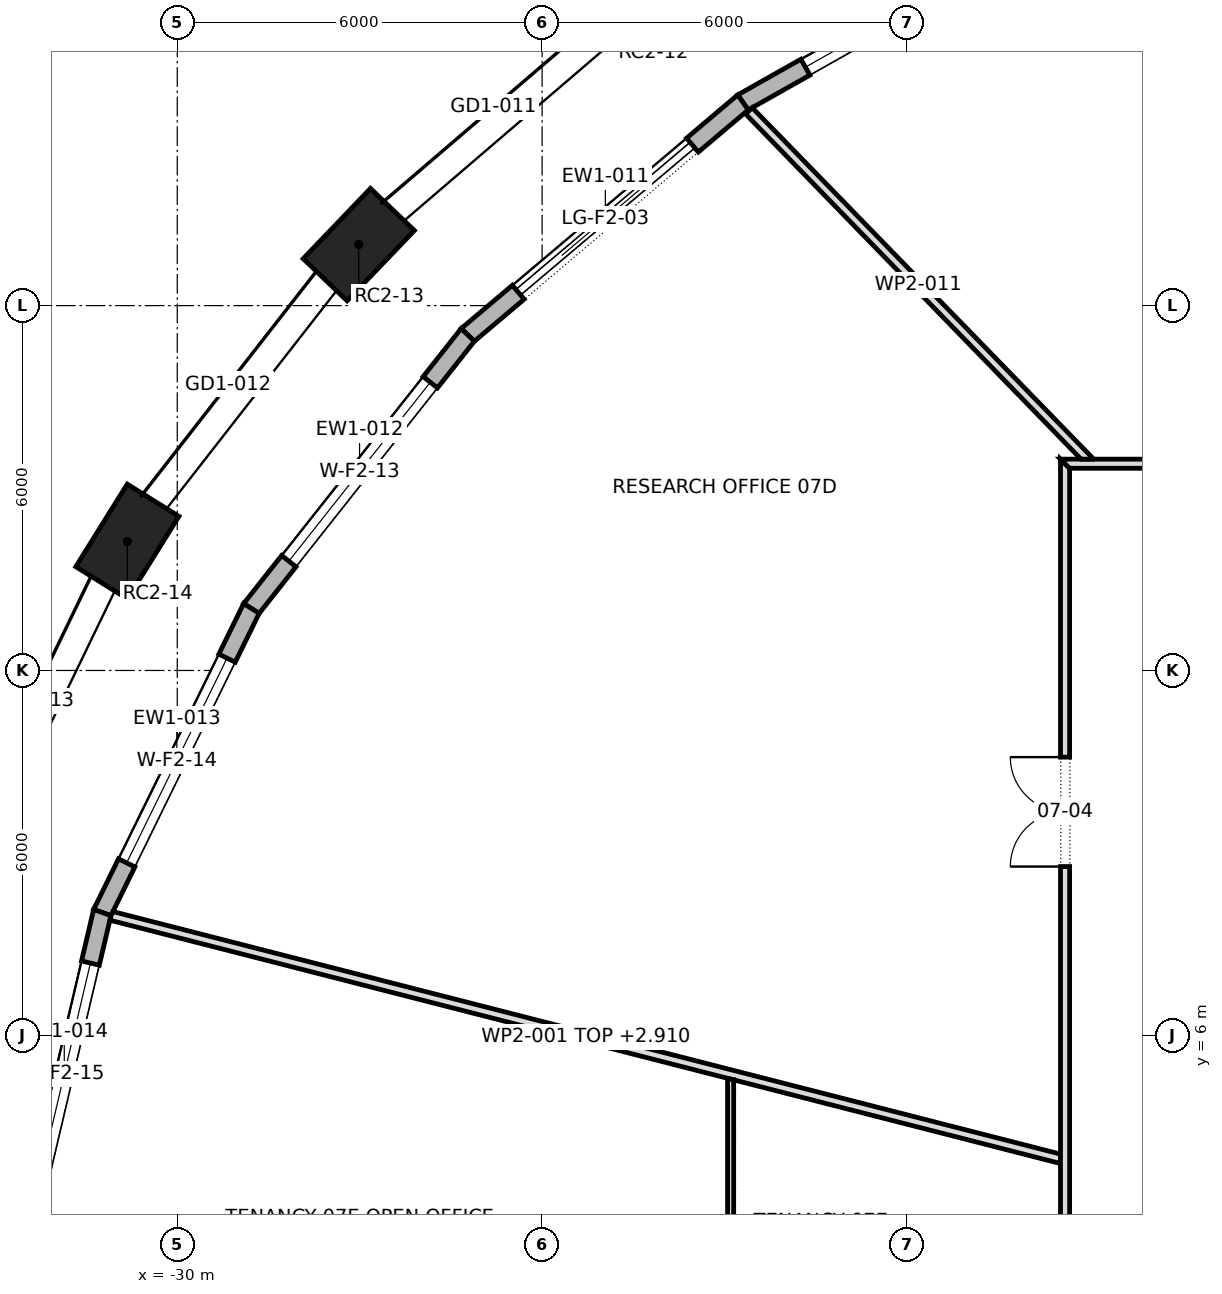
"""IFC4 building model, lengths in metres.
Left out: names, types, materials, properties, quantities, classifications, styles, units other than length and angle.
Written with IfcOpenShell. Run it as: python <this file> out.ifc"""

import sys

from ifc_helpers import new_model, si_unit, direction, frame, frame_2d, origin, origin_2d, place, context, subcontext, project, spatial, polyline, rectangle, outline, extrude, element, fill, save


model = new_model("IFC4")
c1 = context("Model", 3, precision=1e-05, world=origin(), true_north=direction((0.0, 1.0)))
c2 = subcontext(c1, "Body", "Model", "MODEL_VIEW")
j1 = project(units=[si_unit("LENGTHUNIT", "METRE"), si_unit("PLANEANGLEUNIT", "RADIAN")], contexts=[c1])
p1 = place(None, origin())
s1 = spatial("IfcSite", under=j1, at=p1, CompositionType="ELEMENT")
p2 = place(p1, origin())
s2 = spatial("IfcBuilding", under=s1, at=p2, CompositionType="ELEMENT")
p3 = place(p2, frame((0.0, 0.0, 112.9)))
s3 = spatial("IfcBuildingStorey", under=s2, at=p3, CompositionType="ELEMENT", Elevation=112.9)
for number, where, z_axis, x_axis in (
    (1, (-27.015, 19.003, 0.0), (0.0, 0.0, 1.0), (-0.692, -0.722, 0.0)),
    (2, (-30.821, 14.121, 0.0), (0.0, 0.0, 1.0), (-0.529, -0.849, 0.0)),
):
    element("IfcColumn", number, at=place(p3, frame(where, z_axis=z_axis, x_axis=x_axis)), inside=s3, PredefinedType="COLUMN", context=c2, shape_type="SweptSolid", body=[
        extrude(rectangle(XDim=1.6, YDim=1.0, at=origin_2d()), origin(), (0.0, 0.0, 1.0), 4.2),
    ])
p4 = place(p3, frame((-15.377, 24.344, 0.0), z_axis=(0.0, 0.0, 1.0), x_axis=(-0.870828448417, -0.491587035455, 0.0)))
e3 = element("IfcWall", 3, at=p4, inside=s3, PredefinedType="STANDARD", context=c2, shape_type="SweptSolid", body=[
    extrude(outline(polyline([(-0.013, -0.15), (6.123, -0.15), (6.094, 0.15), (0.013, 0.15), (-0.013, -0.15)])), origin(), (0.0, 0.0, 1.0), 3.9),
])
p5 = place(p4, frame((1.179, 0.0, 0.6)))
e4 = element("IfcOpeningElement", 4, at=p5, cuts=e3, PredefinedType="OPENING", context=c2, shape_type="SweptSolid", body=[
    extrude(rectangle(XDim=3.75, YDim=2.85, at=frame_2d((1.875, 1.425))), frame((0.0, 0.162, 0.0), z_axis=(0.0, -1.0, 0.0), x_axis=(1.0, 0.0, 0.0)), (0.0, 0.0, 1.0), 0.324),
])
p6 = place(p3, frame((-20.697, 21.341, 0.0), z_axis=(0.0, 0.0, 1.0), x_axis=(-0.763894031266, -0.645341699409, 0.0)))
e5 = element("IfcWall", 5, at=p6, inside=s3, PredefinedType="STANDARD", context=c2, shape_type="SweptSolid", body=[
    extrude(outline(polyline([(-0.014, -0.15), (5.94, -0.15), (5.91, 0.15), (0.014, 0.15), (-0.014, -0.15)])), origin(), (0.0, 0.0, 1.0), 3.9),
])
p7 = place(p6, frame((1.087, 0.0, 0.0)))
e6 = element("IfcOpeningElement", 6, at=p7, cuts=e5, PredefinedType="OPENING", context=c2, shape_type="SweptSolid", body=[
    extrude(rectangle(XDim=3.75, YDim=3.45, at=frame_2d((1.875, 1.725))), frame((0.0, 0.162, 0.0), z_axis=(0.0, -1.0, 0.0), x_axis=(1.0, 0.0, 0.0)), (0.0, 0.0, 1.0), 0.324),
])
p8 = place(p3, frame((-25.223, 17.518, 0.0), z_axis=(0.0, 0.0, 1.0), x_axis=(-0.620329992039, -0.784340934146, 0.0)))
e7 = element("IfcWall", 7, at=p8, inside=s3, PredefinedType="STANDARD", context=c2, shape_type="SweptSolid", body=[
    extrude(outline(polyline([(-0.015, -0.15), (5.751, -0.15), (5.719, 0.15), (0.015, 0.15), (-0.015, -0.15)])), origin(), (0.0, 0.0, 1.0), 3.9),
])
p9 = place(p8, frame((0.993, 0.0, 0.6)))
e8 = element("IfcOpeningElement", 8, at=p9, cuts=e7, PredefinedType="OPENING", context=c2, shape_type="SweptSolid", body=[
    extrude(rectangle(XDim=3.75, YDim=2.85, at=frame_2d((1.875, 1.425))), frame((0.0, 0.162, 0.0), z_axis=(0.0, -1.0, 0.0), x_axis=(1.0, 0.0, 0.0)), (0.0, 0.0, 1.0), 0.324),
])
p10 = place(p3, frame((-28.781, 13.019, 0.0), z_axis=(0.0, 0.0, 1.0), x_axis=(-0.440238988749, -0.897880633929, 0.0)))
e9 = element("IfcWall", 9, at=p10, inside=s3, PredefinedType="STANDARD", context=c2, shape_type="SweptSolid", body=[
    extrude(outline(polyline([(-0.016, -0.15), (5.586, -0.15), (5.553, 0.15), (0.016, 0.15), (-0.016, -0.15)])), origin(), (0.0, 0.0, 1.0), 3.9),
])
p11 = place(p10, frame((0.91, 0.0, 0.6)))
e10 = element("IfcOpeningElement", 10, at=p11, cuts=e9, PredefinedType="OPENING", context=c2, shape_type="SweptSolid", body=[
    extrude(rectangle(XDim=3.75, YDim=2.85, at=frame_2d((1.875, 1.425))), frame((0.0, 0.162, 0.0), z_axis=(0.0, -1.0, 0.0), x_axis=(1.0, 0.0, 0.0)), (0.0, 0.0, 1.0), 0.324),
])
p12 = place(p3, frame((-31.233, 8.019, 0.0), z_axis=(0.0, 0.0, 1.0), x_axis=(-0.229193964616, -0.973380771632, 0.0)))
e11 = element("IfcWall", 11, at=p12, inside=s3, PredefinedType="STANDARD", context=c2, shape_type="SweptSolid", body=[
    extrude(outline(polyline([(-0.017, -0.15), (5.473, -0.15), (5.439, 0.15), (0.017, 0.15), (-0.017, -0.15)])), origin(), (0.0, 0.0, 1.0), 3.9),
])
p13 = place(p12, frame((0.853, 0.0, 0.6)))
e12 = element("IfcOpeningElement", 12, at=p13, cuts=e11, PredefinedType="OPENING", context=c2, shape_type="SweptSolid", body=[
    extrude(rectangle(XDim=3.75, YDim=2.85, at=frame_2d((1.875, 1.425))), frame((0.0, 0.162, 0.0), z_axis=(0.0, -1.0, 0.0), x_axis=(1.0, 0.0, 0.0)), (0.0, 0.0, 1.0), 0.324),
])
p14 = place(p3, frame((-31.09, 7.966, 0.0), z_axis=(0.0, 0.0, 1.0), x_axis=(0.968771016809, -0.247957086995, 0.0)))
e13 = element("IfcWall", 13, at=p14, inside=s3, PredefinedType="PARTITIONING", context=c2, shape_type="SweptSolid", body=[
    extrude(outline(polyline([(16.137, -0.075), (16.137, -0.073), (16.099, 0.075), (14.312, 0.075), (12.524, 0.075), (10.737, 0.075), (8.95, 0.075), (7.163, 0.075), (5.375, 0.075), (3.588, 0.075), (1.801, 0.075), (0.014, 0.075), (0.0, 0.008), (0.0, -0.067), (0.0, -0.075), (1.793, -0.075), (3.586, -0.075), (5.379, -0.075), (7.172, -0.075), (8.965, -0.075), (10.758, -0.075), (12.551, -0.075), (14.344, -0.075), (16.137, -0.075)])), origin(), (0.0, 0.0, 1.0), 2.91),
])
p15 = place(p3, frame((-20.9, -14.434, 0.0), z_axis=(0.0, 0.0, 1.0), x_axis=(0.0, 1.0, 0.0)))
e14 = element("IfcWall", 14, at=p15, inside=s3, PredefinedType="PARTITIONING", context=c2, shape_type="SweptSolid", body=[
    extrude(outline(polyline([(0.069, -0.05), (1.772, -0.05), (3.475, -0.05), (5.178, -0.05), (6.881, -0.05), (8.583, -0.05), (8.583, -0.05), (8.684, -0.05), (8.684, -0.05), (10.321, -0.05), (11.958, -0.05), (13.596, -0.05), (15.234, -0.05), (15.234, -0.05), (15.333, -0.05), (15.333, -0.05), (16.789, -0.05), (18.245, -0.05), (19.701, -0.05), (19.727, 0.05), (19.727, 0.05), (17.942, 0.05), (16.156, 0.05), (14.372, 0.05), (12.587, 0.05), (10.802, 0.05), (9.017, 0.05), (9.01, 0.048), (9.009, 0.05), (7.208, 0.05), (5.406, 0.05), (3.604, 0.05), (1.802, 0.05), (0.0, 0.05), (0.069, -0.05)])), origin(), (0.0, 0.0, 1.0), 3.9),
])
p16 = place(p15, frame((13.539, 0.0, 0.0)))
e15 = element("IfcOpeningElement", 15, at=p16, cuts=e14, PredefinedType="OPENING", context=c2, shape_type="SweptSolid", body=[
    extrude(rectangle(XDim=0.9, YDim=2.1, at=frame_2d((0.45, 1.05))), frame((0.0, 0.062, 0.0), z_axis=(0.0, -1.0, 0.0), x_axis=(1.0, 0.0, 0.0)), (0.0, 0.0, 1.0), 0.124),
])
p17 = place(p3, frame((-15.4, -15.475, 0.0), z_axis=(0.0, 0.0, 1.0), x_axis=(0.0, 1.0, 0.0)))
e16 = element("IfcWall", 16, at=p17, inside=s3, PredefinedType="PARTITIONING", context=c2, shape_type="SweptSolid", body=[
    extrude(outline(polyline([(0.15, -0.075), (2.066, -0.075), (3.981, -0.075), (5.897, -0.075), (7.812, -0.075), (9.728, -0.075), (11.644, -0.075), (13.56, -0.075), (15.475, -0.075), (17.391, -0.075), (19.306, -0.075), (21.222, -0.075), (23.138, -0.075), (25.053, -0.075), (26.969, -0.075), (28.885, -0.075), (30.8, -0.075), (30.95, 0.075), (29.016, 0.075), (27.081, 0.075), (25.147, 0.075), (23.212, 0.075), (21.278, 0.075), (19.344, 0.075), (17.409, 0.075), (15.475, 0.075), (13.541, 0.075), (11.606, 0.075), (9.672, 0.075), (7.738, 0.075), (5.803, 0.075), (3.869, 0.075), (1.935, 0.075), (0.0, 0.075), (0.15, -0.075)])), origin(), (0.0, 0.0, 1.0), 3.9),
])
p18 = place(p17, frame((24.25, 0.0, 0.0)))
e17 = element("IfcOpeningElement", 17, at=p18, cuts=e16, PredefinedType="OPENING", context=c2, shape_type="SweptSolid", body=[
    extrude(rectangle(XDim=1.8, YDim=2.1, at=frame_2d((0.9, 1.05))), frame((0.0, 0.087, 0.0), z_axis=(0.0, -1.0, 0.0), x_axis=(1.0, 0.0, 0.0)), (0.0, 0.0, 1.0), 0.174),
])
p19 = place(p17, frame((6.735, 0.0, 0.0)))
e18 = element("IfcOpeningElement", 18, at=p19, cuts=e16, PredefinedType="OPENING", context=c2, shape_type="SweptSolid", body=[
    extrude(rectangle(XDim=1.0, YDim=2.1, at=frame_2d((0.5, 1.05))), frame((0.0, 0.087, 0.0), z_axis=(0.0, -1.0, 0.0), x_axis=(1.0, 0.0, 0.0)), (0.0, 0.0, 1.0), 0.174),
])
p20 = place(p17, frame((12.5, 0.0, 0.0)))
e19 = element("IfcOpeningElement", 19, at=p20, cuts=e16, PredefinedType="OPENING", context=c2, shape_type="SweptSolid", body=[
    extrude(rectangle(XDim=1.0, YDim=2.1, at=frame_2d((0.5, 1.05))), frame((0.0, 0.087, 0.0), z_axis=(0.0, -1.0, 0.0), x_axis=(1.0, 0.0, 0.0)), (0.0, 0.0, 1.0), 0.174),
])
p21 = place(p17, frame((17.375, 0.0, 0.0)))
e20 = element("IfcOpeningElement", 20, at=p21, cuts=e16, PredefinedType="OPENING", context=c2, shape_type="SweptSolid", body=[
    extrude(rectangle(XDim=1.0, YDim=2.1, at=frame_2d((0.5, 1.05))), frame((0.0, 0.087, 0.0), z_axis=(0.0, -1.0, 0.0), x_axis=(1.0, 0.0, 0.0)), (0.0, 0.0, 1.0), 0.174),
])
p22 = place(p3, frame((-15.475, 15.4, 0.0), z_axis=(0.0, 0.0, 1.0), x_axis=(1.0, 0.0, 0.0)))
e21 = element("IfcWall", 21, at=p22, inside=s3, PredefinedType="PARTITIONING", context=c2, shape_type="SweptSolid", body=[
    extrude(outline(polyline([(0.15, -0.075), (2.066, -0.075), (3.981, -0.075), (5.897, -0.075), (7.812, -0.075), (9.728, -0.075), (11.644, -0.075), (13.56, -0.075), (15.475, -0.075), (17.391, -0.075), (19.306, -0.075), (21.222, -0.075), (23.138, -0.075), (25.053, -0.075), (26.969, -0.075), (28.885, -0.075), (30.8, -0.075), (30.95, 0.075), (29.016, 0.075), (27.081, 0.075), (25.147, 0.075), (23.212, 0.075), (21.278, 0.075), (19.344, 0.075), (17.409, 0.075), (15.475, 0.075), (13.541, 0.075), (11.606, 0.075), (9.672, 0.075), (7.738, 0.075), (5.803, 0.075), (3.869, 0.075), (1.935, 0.075), (0.0, 0.075), (0.15, -0.075)])), origin(), (0.0, 0.0, 1.0), 3.9),
])
p23 = place(p22, frame((27.545, 0.0, 0.0)))
e22 = element("IfcOpeningElement", 22, at=p23, cuts=e21, PredefinedType="OPENING", context=c2, shape_type="SweptSolid", body=[
    extrude(rectangle(XDim=1.0, YDim=2.1, at=frame_2d((0.5, 1.05))), frame((0.0, 0.087, 0.0), z_axis=(0.0, -1.0, 0.0), x_axis=(1.0, 0.0, 0.0)), (0.0, 0.0, 1.0), 0.174),
])
p24 = place(p22, frame((18.545, 0.0, 0.0)))
e23 = element("IfcOpeningElement", 23, at=p24, cuts=e21, PredefinedType="OPENING", context=c2, shape_type="SweptSolid", body=[
    extrude(rectangle(XDim=1.8, YDim=2.1, at=frame_2d((0.9, 1.05))), frame((0.0, 0.087, 0.0), z_axis=(0.0, -1.0, 0.0), x_axis=(1.0, 0.0, 0.0)), (0.0, 0.0, 1.0), 0.174),
])
p25 = place(p22, frame((6.195, 0.0, 0.0)))
e24 = element("IfcOpeningElement", 24, at=p25, cuts=e21, PredefinedType="OPENING", context=c2, shape_type="SweptSolid", body=[
    extrude(rectangle(XDim=1.8, YDim=2.1, at=frame_2d((0.9, 1.05))), frame((0.0, 0.087, 0.0), z_axis=(0.0, -1.0, 0.0), x_axis=(1.0, 0.0, 0.0)), (0.0, 0.0, 1.0), 0.174),
])
p26 = place(p3, frame((-14.982, 15.423, 0.0), z_axis=(0.0, 0.0, 1.0), x_axis=(-0.696915710248, 0.717153046992, 0.0)))
e25 = element("IfcWall", 25, at=p26, inside=s3, PredefinedType="PARTITIONING", context=c2, shape_type="SweptSolid", body=[
    extrude(outline(polyline([(8.059, 0.075), (6.08, 0.075), (4.102, 0.075), (2.124, 0.075), (0.146, 0.075), (0.0, -0.075), (0.0, -0.075), (1.612, -0.075), (3.223, -0.075), (4.835, -0.075), (6.447, -0.075), (8.059, -0.075), (8.059, 0.075)])), origin(), (0.0, 0.0, 1.0), 3.9),
])
p27 = place(p5, origin())
e26 = element("IfcWindow", 26, at=p27, inside=s3, PartitioningType="TRIPLE_PANEL_VERTICAL", PredefinedType="WINDOW", context=c2, shape_type="SweptSolid", body=[
    extrude(rectangle(XDim=3.75, YDim=2.85, at=frame_2d((1.875, 1.425))), frame((0.0, 0.03, 0.0), z_axis=(0.0, -1.0, 0.0), x_axis=(1.0, 0.0, 0.0)), (0.0, 0.0, 1.0), 0.06),
])
fill(e4, e26)
p28 = place(p7, origin())
e27 = element("IfcDoor", 27, at=p28, inside=s3, OperationType="DOUBLE_DOOR_SLIDING", PredefinedType="DOOR", context=c2, shape_type="SweptSolid", body=[
    extrude(rectangle(XDim=3.75, YDim=3.45, at=frame_2d((1.875, 1.725))), frame((0.0, 0.025, 0.0), z_axis=(0.0, -1.0, 0.0), x_axis=(1.0, 0.0, 0.0)), (0.0, 0.0, 1.0), 0.05),
])
fill(e6, e27)
p29 = place(p9, origin())
e28 = element("IfcWindow", 28, at=p29, inside=s3, PartitioningType="TRIPLE_PANEL_VERTICAL", PredefinedType="WINDOW", context=c2, shape_type="SweptSolid", body=[
    extrude(rectangle(XDim=3.75, YDim=2.85, at=frame_2d((1.875, 1.425))), frame((0.0, 0.03, 0.0), z_axis=(0.0, -1.0, 0.0), x_axis=(1.0, 0.0, 0.0)), (0.0, 0.0, 1.0), 0.06),
])
fill(e8, e28)
p30 = place(p11, origin())
e29 = element("IfcWindow", 29, at=p30, inside=s3, PartitioningType="TRIPLE_PANEL_VERTICAL", PredefinedType="WINDOW", context=c2, shape_type="SweptSolid", body=[
    extrude(rectangle(XDim=3.75, YDim=2.85, at=frame_2d((1.875, 1.425))), frame((0.0, 0.03, 0.0), z_axis=(0.0, -1.0, 0.0), x_axis=(1.0, 0.0, 0.0)), (0.0, 0.0, 1.0), 0.06),
])
fill(e10, e29)
p31 = place(p13, origin())
e30 = element("IfcWindow", 30, at=p31, inside=s3, PartitioningType="TRIPLE_PANEL_VERTICAL", PredefinedType="WINDOW", context=c2, shape_type="SweptSolid", body=[
    extrude(rectangle(XDim=3.75, YDim=2.85, at=frame_2d((1.875, 1.425))), frame((0.0, 0.03, 0.0), z_axis=(0.0, -1.0, 0.0), x_axis=(1.0, 0.0, 0.0)), (0.0, 0.0, 1.0), 0.06),
])
fill(e12, e30)
p32 = place(p18, origin())
e31 = element("IfcDoor", 31, at=p32, inside=s3, OperationType="DOUBLE_DOOR_SINGLE_SWING", PredefinedType="DOOR", context=c2, shape_type="SweptSolid", body=[
    extrude(rectangle(XDim=1.8, YDim=2.1, at=frame_2d((0.9, 1.05))), frame((0.0, 0.025, 0.0), z_axis=(0.0, -1.0, 0.0), x_axis=(1.0, 0.0, 0.0)), (0.0, 0.0, 1.0), 0.05),
])
fill(e17, e31)
save(model, sys.argv[1])
